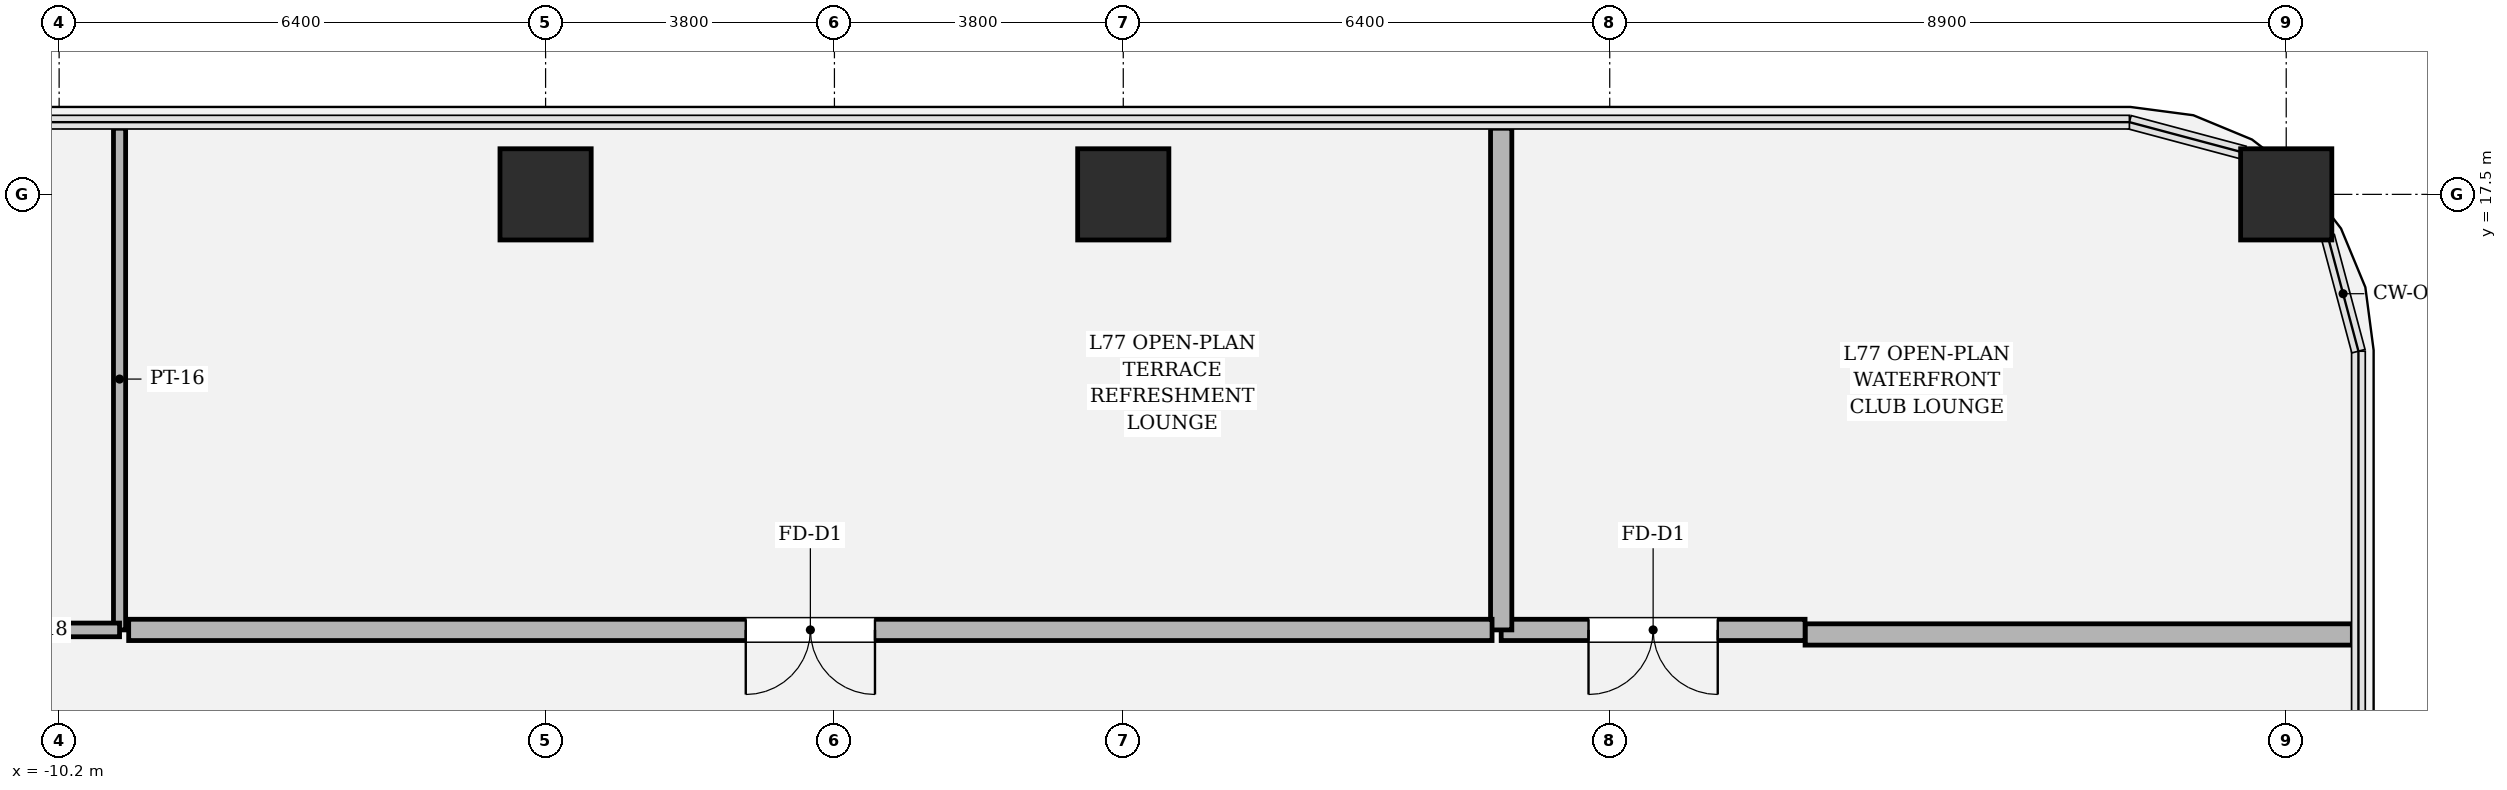
"""IFC4 building model, lengths in metres.
Left out: names, types, materials, properties, quantities, classifications, styles, units other than length and angle.
Written with IfcOpenShell. Run it as: python <this file> out.ifc"""

import sys

from ifc_helpers import new_model, si_unit, direction, frame, frame_2d, origin, origin_2d, place, context, subcontext, project, spatial, rectangle, hollow_rectangle, extrude, element, fill, save


model = new_model("IFC4")
c1 = context("Model", 3, precision=1e-05, world=origin(), true_north=direction((0.0, 1.0)))
c2 = subcontext(c1, "Body", "Model", "MODEL_VIEW")
j1 = project(units=[si_unit("LENGTHUNIT", "METRE"), si_unit("PLANEANGLEUNIT", "RADIAN")], contexts=[c1])
p1 = place(None, origin())
s1 = spatial("IfcSite", under=j1, at=p1, CompositionType="ELEMENT")
p2 = place(p1, origin())
s2 = spatial("IfcBuilding", under=s1, at=p2, CompositionType="ELEMENT")
p3 = place(p2, frame((0.0, 0.0, 325.8)))
s3 = spatial("IfcBuildingStorey", under=s2, at=p3, CompositionType="ELEMENT", Elevation=325.8)
for number, where, z_axis, x_axis in (
    (1, (19.1, 17.5, 0.0), (0.0, 0.0, 1.0), (1.0, 0.0, 0.0)),
    (2, (3.8, 17.5, 0.0), (0.0, 0.0, 1.0), (1.0, 0.0, 0.0)),
    (3, (-3.8, 17.5, 0.0), (0.0, 0.0, 1.0), (1.0, 0.0, 0.0)),
):
    element("IfcColumn", number, at=place(p3, frame(where, z_axis=z_axis, x_axis=x_axis)), inside=s3, PredefinedType="COLUMN", context=c2, shape_type="SweptSolid", body=[
        extrude(hollow_rectangle(XDim=1.2, YDim=1.2, WallThickness=0.035, at=origin_2d()), origin(), (0.0, 0.0, 1.0), 4.2),
    ])
p4 = place(p3, frame((-9.405, 18.37, 0.0), z_axis=(0.0, 0.0, 1.0), x_axis=(0.0, -1.0, 0.0)))
e4 = element("IfcWall", 4, at=p4, inside=s3, PredefinedType="PARTITIONING", context=c2, shape_type="SweptSolid", body=[
    extrude(rectangle(XDim=6.6, YDim=0.16, at=frame_2d((3.3, 0.0))), origin(), (0.0, 0.0, 1.0), 3.394),
])
p5 = place(p3, frame((-9.405, 11.77, 0.0), z_axis=(0.0, 0.0, 1.0), x_axis=(-1.0, 0.0, 0.0)))
e5 = element("IfcWall", 5, at=p5, inside=s3, PredefinedType="PARTITIONING", context=c2, shape_type="SweptSolid", body=[
    extrude(rectangle(XDim=3.365, YDim=0.18, at=frame_2d((1.683, 0.0))), origin(), (0.0, 0.0, 1.0), 3.394),
])
p6 = place(p5, frame((1.157, 0.0, 0.0)))
e6 = element("IfcOpeningElement", 6, at=p6, cuts=e5, PredefinedType="OPENING", context=c2, shape_type="SweptSolid", body=[
    extrude(rectangle(XDim=1.05, YDim=2.2, at=frame_2d((0.525, 1.1))), frame((0.0, 0.1, 0.0), z_axis=(0.0, -1.0, 0.0), x_axis=(1.0, 0.0, 0.0)), (0.0, 0.0, 1.0), 0.2),
])
p7 = place(p3, frame((19.97, 11.71, 0.0), z_axis=(0.0, 0.0, 1.0), x_axis=(-1.0, 0.0, 0.0)))
e7 = element("IfcWall", 7, at=p7, inside=s3, PredefinedType="SOLIDWALL", context=c2, shape_type="SweptSolid", body=[
    extrude(rectangle(XDim=7.2, YDim=0.28, at=frame_2d((3.6, 0.0))), origin(), (0.0, 0.0, 1.0), 3.394),
])
p8 = place(p3, frame((12.77, 11.77, 0.0), z_axis=(0.0, 0.0, 1.0), x_axis=(-1.0, 0.0, 0.0)))
e8 = element("IfcWall", 8, at=p8, inside=s3, PredefinedType="SOLIDWALL", context=c2, shape_type="SweptSolid", body=[
    extrude(rectangle(XDim=3.998, YDim=0.28, at=frame_2d((1.999, 0.0))), origin(), (0.0, 0.0, 1.0), 3.394),
])
p9 = place(p8, frame((1.149, 0.0, 0.0)))
e9 = element("IfcOpeningElement", 9, at=p9, cuts=e8, PredefinedType="OPENING", context=c2, shape_type="SweptSolid", body=[
    extrude(rectangle(XDim=1.7, YDim=2.3, at=frame_2d((0.85, 1.15))), frame((0.0, 0.15, 0.0), z_axis=(0.0, -1.0, 0.0), x_axis=(1.0, 0.0, 0.0)), (0.0, 0.0, 1.0), 0.3),
])
p10 = place(p3, frame((8.772, 11.77, 0.0), z_axis=(0.0, 0.0, 1.0), x_axis=(0.0, 1.0, 0.0)))
e10 = element("IfcWall", 10, at=p10, inside=s3, PredefinedType="SOLIDWALL", context=c2, shape_type="SweptSolid", body=[
    extrude(rectangle(XDim=6.6, YDim=0.28, at=frame_2d((3.3, 0.0))), origin(), (0.0, 0.0, 1.0), 3.394),
])
p11 = place(p3, frame((8.652, 11.77, 0.0), z_axis=(0.0, 0.0, 1.0), x_axis=(-1.0, 0.0, 0.0)))
e11 = element("IfcWall", 11, at=p11, inside=s3, PredefinedType="SOLIDWALL", context=c2, shape_type="SweptSolid", body=[
    extrude(rectangle(XDim=17.937, YDim=0.28, at=frame_2d((8.969, 0.0))), origin(), (0.0, 0.0, 1.0), 3.394),
])
p12 = place(p11, frame((8.118, 0.0, 0.0)))
e12 = element("IfcOpeningElement", 12, at=p12, cuts=e11, PredefinedType="OPENING", context=c2, shape_type="SweptSolid", body=[
    extrude(rectangle(XDim=1.7, YDim=2.3, at=frame_2d((0.85, 1.15))), frame((0.0, 0.15, 0.0), z_axis=(0.0, -1.0, 0.0), x_axis=(1.0, 0.0, 0.0)), (0.0, 0.0, 1.0), 0.3),
])
p13 = place(p9, origin())
e13 = element("IfcDoor", 13, at=p13, inside=s3, OperationType="DOUBLE_DOOR_SINGLE_SWING", PredefinedType="DOOR", context=c2, shape_type="SweptSolid", body=[
    extrude(rectangle(XDim=1.7, YDim=2.3, at=frame_2d((0.85, 1.15))), frame((0.0, 0.025, 0.0), z_axis=(0.0, -1.0, 0.0), x_axis=(1.0, 0.0, 0.0)), (0.0, 0.0, 1.0), 0.05),
])
fill(e9, e13)
p14 = place(p12, origin())
e14 = element("IfcDoor", 14, at=p14, inside=s3, OperationType="DOUBLE_DOOR_SINGLE_SWING", PredefinedType="DOOR", context=c2, shape_type="SweptSolid", body=[
    extrude(rectangle(XDim=1.7, YDim=2.3, at=frame_2d((0.85, 1.15))), frame((0.0, 0.025, 0.0), z_axis=(0.0, -1.0, 0.0), x_axis=(1.0, 0.0, 0.0)), (0.0, 0.0, 1.0), 0.05),
])
fill(e12, e14)
save(model, sys.argv[1])
